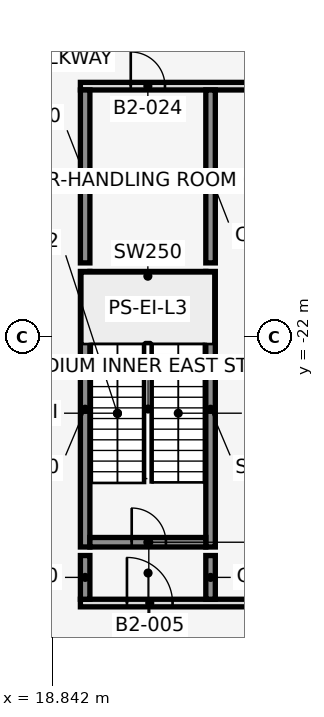
"""IFC4 building model, lengths in metres.
Left out: names, types, materials, properties, quantities, classifications, styles, units other than length and angle.
Written with IfcOpenShell. Run it as: python <this file> out.ifc"""

import sys

from ifc_helpers import new_model, si_unit, direction, frame, frame_2d, origin, place, context, subcontext, project, spatial, rectangle, extrude, element, fill, save


model = new_model("IFC4")
c1 = context("Model", 3, precision=1e-05, world=origin(), true_north=direction((0.0, 1.0)))
c2 = subcontext(c1, "Body", "Model", "MODEL_VIEW")
j1 = project(units=[si_unit("LENGTHUNIT", "METRE"), si_unit("PLANEANGLEUNIT", "RADIAN")], contexts=[c1])
p1 = place(None, origin())
s1 = spatial("IfcSite", under=j1, at=p1, CompositionType="ELEMENT")
p2 = place(p1, origin())
s2 = spatial("IfcBuilding", under=s1, at=p2, CompositionType="ELEMENT")
p3 = place(p2, frame((0.0, 0.0, -10.0)))
s3 = spatial("IfcBuildingStorey", under=s2, at=p3, CompositionType="ELEMENT", Elevation=-10.0)
for number, where, z_axis, x_axis in (
    (1, (19.7, -27.525, 0.0), (0.0, 0.0, 1.0), (0.0, 1.0, 0.0)),
    (2, (23.0, -27.525, 0.0), (0.0, 0.0, 1.0), (0.0, 1.0, 0.0)),
):
    element("IfcWall", number, at=place(p3, frame(where, z_axis=z_axis, x_axis=x_axis)), inside=s3, PredefinedType="SHEAR", context=c2, shape_type="SweptSolid", body=[
        extrude(rectangle(XDim=7.25, YDim=0.25, at=frame_2d((3.625, 0.0))), origin(), (0.0, 0.0, 1.0), 5.0),
    ])
p4 = place(p3, frame((19.825, -27.4, 0.0), z_axis=(0.0, 0.0, 1.0), x_axis=(1.0, 0.0, 0.0)))
e3 = element("IfcWall", 3, at=p4, inside=s3, PredefinedType="SHEAR", context=c2, shape_type="SweptSolid", body=[
    extrude(rectangle(XDim=3.05, YDim=0.25, at=frame_2d((1.525, 0.0))), origin(), (0.0, 0.0, 1.0), 5.0),
])
p5 = place(p4, frame((1.1, 0.0, 0.0)))
e4 = element("IfcOpeningElement", 4, at=p5, cuts=e3, PredefinedType="OPENING", context=c2, shape_type="SweptSolid", body=[
    extrude(rectangle(XDim=0.9, YDim=2.1, at=frame_2d((0.45, 1.05))), frame((0.0, 0.137, 0.0), z_axis=(0.0, -1.0, 0.0), x_axis=(1.0, 0.0, 0.0)), (0.0, 0.0, 1.0), 0.274),
])
p6 = place(p3, frame((19.825, -20.4, 0.0), z_axis=(0.0, 0.0, 1.0), x_axis=(1.0, 0.0, 0.0)))
e5 = element("IfcWall", 5, at=p6, inside=s3, PredefinedType="SHEAR", context=c2, shape_type="SweptSolid", body=[
    extrude(rectangle(XDim=3.05, YDim=0.25, at=frame_2d((1.525, 0.0))), origin(), (0.0, 0.0, 1.0), 5.0),
])
p7 = place(p3, frame((19.575, -29.0, 0.0), z_axis=(0.0, 0.0, 1.0), x_axis=(1.0, 0.0, 0.0)))
e6 = element("IfcWall", 6, at=p7, inside=s3, PredefinedType="PARTITIONING", context=c2, shape_type="SweptSolid", body=[
    extrude(rectangle(XDim=28.425, YDim=0.2, at=frame_2d((14.212, 0.0))), origin(), (0.0, 0.0, 1.0), 4.7),
])
p8 = place(p7, frame((1.225, 0.0, 0.0)))
e7 = element("IfcOpeningElement", 7, at=p8, cuts=e6, PredefinedType="OPENING", context=c2, shape_type="SweptSolid", body=[
    extrude(rectangle(XDim=1.2, YDim=2.1, at=frame_2d((0.6, 1.05))), frame((0.0, 0.112, 0.0), z_axis=(0.0, -1.0, 0.0), x_axis=(1.0, 0.0, 0.0)), (0.0, 0.0, 1.0), 0.224),
])
p9 = place(p7, frame((19.425, 0.0, 0.0)))
e8 = element("IfcOpeningElement", 8, at=p9, cuts=e6, PredefinedType="OPENING", context=c2, shape_type="SweptSolid", body=[
    extrude(rectangle(XDim=1.2, YDim=2.1, at=frame_2d((0.6, 1.05))), frame((0.0, 0.112, 0.0), z_axis=(0.0, -1.0, 0.0), x_axis=(1.0, 0.0, 0.0)), (0.0, 0.0, 1.0), 0.224),
])
p10 = place(p3, frame((19.575, -15.4, 0.0), z_axis=(0.0, 0.0, 1.0), x_axis=(1.0, 0.0, 0.0)))
e9 = element("IfcWall", 9, at=p10, inside=s3, PredefinedType="PARTITIONING", context=c2, shape_type="SweptSolid", body=[
    extrude(rectangle(XDim=28.425, YDim=0.2, at=frame_2d((14.212, 0.0))), origin(), (0.0, 0.0, 1.0), 4.7),
])
p11 = place(p10, frame((1.325, 0.0, 0.0)))
e10 = element("IfcOpeningElement", 10, at=p11, cuts=e9, PredefinedType="OPENING", context=c2, shape_type="SweptSolid", body=[
    extrude(rectangle(XDim=0.9, YDim=2.1, at=frame_2d((0.45, 1.05))), frame((0.0, 0.112, 0.0), z_axis=(0.0, -1.0, 0.0), x_axis=(1.0, 0.0, 0.0)), (0.0, 0.0, 1.0), 0.224),
])
p12 = place(p10, frame((5.925, 0.0, 0.0)))
e11 = element("IfcOpeningElement", 11, at=p12, cuts=e9, PredefinedType="OPENING", context=c2, shape_type="SweptSolid", body=[
    extrude(rectangle(XDim=1.0, YDim=2.1, at=frame_2d((0.5, 1.05))), frame((0.0, 0.112, 0.0), z_axis=(0.0, -1.0, 0.0), x_axis=(1.0, 0.0, 0.0)), (0.0, 0.0, 1.0), 0.224),
])
p13 = place(p10, frame((11.825, 0.0, 0.0)))
e12 = element("IfcOpeningElement", 12, at=p13, cuts=e9, PredefinedType="OPENING", context=c2, shape_type="SweptSolid", body=[
    extrude(rectangle(XDim=1.0, YDim=2.1, at=frame_2d((0.5, 1.05))), frame((0.0, 0.112, 0.0), z_axis=(0.0, -1.0, 0.0), x_axis=(1.0, 0.0, 0.0)), (0.0, 0.0, 1.0), 0.224),
])
p14 = place(p10, frame((16.325, 0.0, 0.0)))
e13 = element("IfcOpeningElement", 13, at=p14, cuts=e9, PredefinedType="OPENING", context=c2, shape_type="SweptSolid", body=[
    extrude(rectangle(XDim=1.0, YDim=2.1, at=frame_2d((0.5, 1.05))), frame((0.0, 0.112, 0.0), z_axis=(0.0, -1.0, 0.0), x_axis=(1.0, 0.0, 0.0)), (0.0, 0.0, 1.0), 0.224),
])
p15 = place(p10, frame((19.625, 0.0, 0.0)))
e14 = element("IfcOpeningElement", 14, at=p15, cuts=e9, PredefinedType="OPENING", context=c2, shape_type="SweptSolid", body=[
    extrude(rectangle(XDim=0.9, YDim=2.1, at=frame_2d((0.45, 1.05))), frame((0.0, 0.112, 0.0), z_axis=(0.0, -1.0, 0.0), x_axis=(1.0, 0.0, 0.0)), (0.0, 0.0, 1.0), 0.224),
])
p16 = place(p10, frame((24.525, 0.0, 0.0)))
e15 = element("IfcOpeningElement", 15, at=p16, cuts=e9, PredefinedType="OPENING", context=c2, shape_type="SweptSolid", body=[
    extrude(rectangle(XDim=1.0, YDim=2.1, at=frame_2d((0.5, 1.05))), frame((0.0, 0.112, 0.0), z_axis=(0.0, -1.0, 0.0), x_axis=(1.0, 0.0, 0.0)), (0.0, 0.0, 1.0), 0.224),
])
p17 = place(p3, frame((19.7, -28.9, 0.0), z_axis=(0.0, 0.0, 1.0), x_axis=(0.0, 1.0, 0.0)))
e16 = element("IfcWall", 16, at=p17, inside=s3, PredefinedType="SHEAR", context=c2, shape_type="SweptSolid", body=[
    extrude(rectangle(XDim=1.15, YDim=0.25, at=frame_2d((0.575, 0.0))), origin(), (0.0, 0.0, 1.0), 5.0),
])
p18 = place(p3, frame((19.7, -20.05, 0.0), z_axis=(0.0, 0.0, 1.0), x_axis=(0.0, 1.0, 0.0)))
e17 = element("IfcWall", 17, at=p18, inside=s3, PredefinedType="SHEAR", context=c2, shape_type="SweptSolid", body=[
    extrude(rectangle(XDim=4.55, YDim=0.25, at=frame_2d((2.275, 0.0))), origin(), (0.0, 0.0, 1.0), 5.0),
])
p19 = place(p3, frame((23.0, -28.9, 0.0), z_axis=(0.0, 0.0, 1.0), x_axis=(0.0, 1.0, 0.0)))
e18 = element("IfcWall", 18, at=p19, inside=s3, PredefinedType="SHEAR", context=c2, shape_type="SweptSolid", body=[
    extrude(rectangle(XDim=1.15, YDim=0.25, at=frame_2d((0.575, 0.0))), origin(), (0.0, 0.0, 1.0), 5.0),
])
p20 = place(p3, frame((23.0, -20.05, 0.0), z_axis=(0.0, 0.0, 1.0), x_axis=(0.0, 1.0, 0.0)))
e19 = element("IfcWall", 19, at=p20, inside=s3, PredefinedType="SHEAR", context=c2, shape_type="SweptSolid", body=[
    extrude(rectangle(XDim=4.55, YDim=0.25, at=frame_2d((2.275, 0.0))), origin(), (0.0, 0.0, 1.0), 5.0),
])
p21 = place(p8, origin())
e20 = element("IfcDoor", 20, at=p21, inside=s3, OperationType="SINGLE_SWING_LEFT", PredefinedType="DOOR", context=c2, shape_type="SweptSolid", body=[
    extrude(rectangle(XDim=1.2, YDim=2.1, at=frame_2d((0.6, 1.05))), frame((0.0, 0.025, 0.0), z_axis=(0.0, -1.0, 0.0), x_axis=(1.0, 0.0, 0.0)), (0.0, 0.0, 1.0), 0.05),
])
fill(e7, e20)
p22 = place(p5, origin())
e21 = element("IfcDoor", 21, at=p22, inside=s3, OperationType="SINGLE_SWING_RIGHT", PredefinedType="DOOR", context=c2, shape_type="SweptSolid", body=[
    extrude(rectangle(XDim=0.9, YDim=2.1, at=frame_2d((0.45, 1.05))), frame((0.0, 0.025, 0.0), z_axis=(0.0, -1.0, 0.0), x_axis=(1.0, 0.0, 0.0)), (0.0, 0.0, 1.0), 0.05),
])
fill(e4, e21)
p23 = place(p11, frame((0.9, 0.0, 0.0), z_axis=(0.0, 0.0, 1.0), x_axis=(-1.0, 0.0, 0.0)))
e22 = element("IfcDoor", 22, at=p23, inside=s3, OperationType="SINGLE_SWING_RIGHT", PredefinedType="DOOR", context=c2, shape_type="SweptSolid", body=[
    extrude(rectangle(XDim=0.9, YDim=2.1, at=frame_2d((0.45, 1.05))), frame((0.0, 0.025, 0.0), z_axis=(0.0, -1.0, 0.0), x_axis=(1.0, 0.0, 0.0)), (0.0, 0.0, 1.0), 0.05),
])
fill(e10, e22)
save(model, sys.argv[1])
